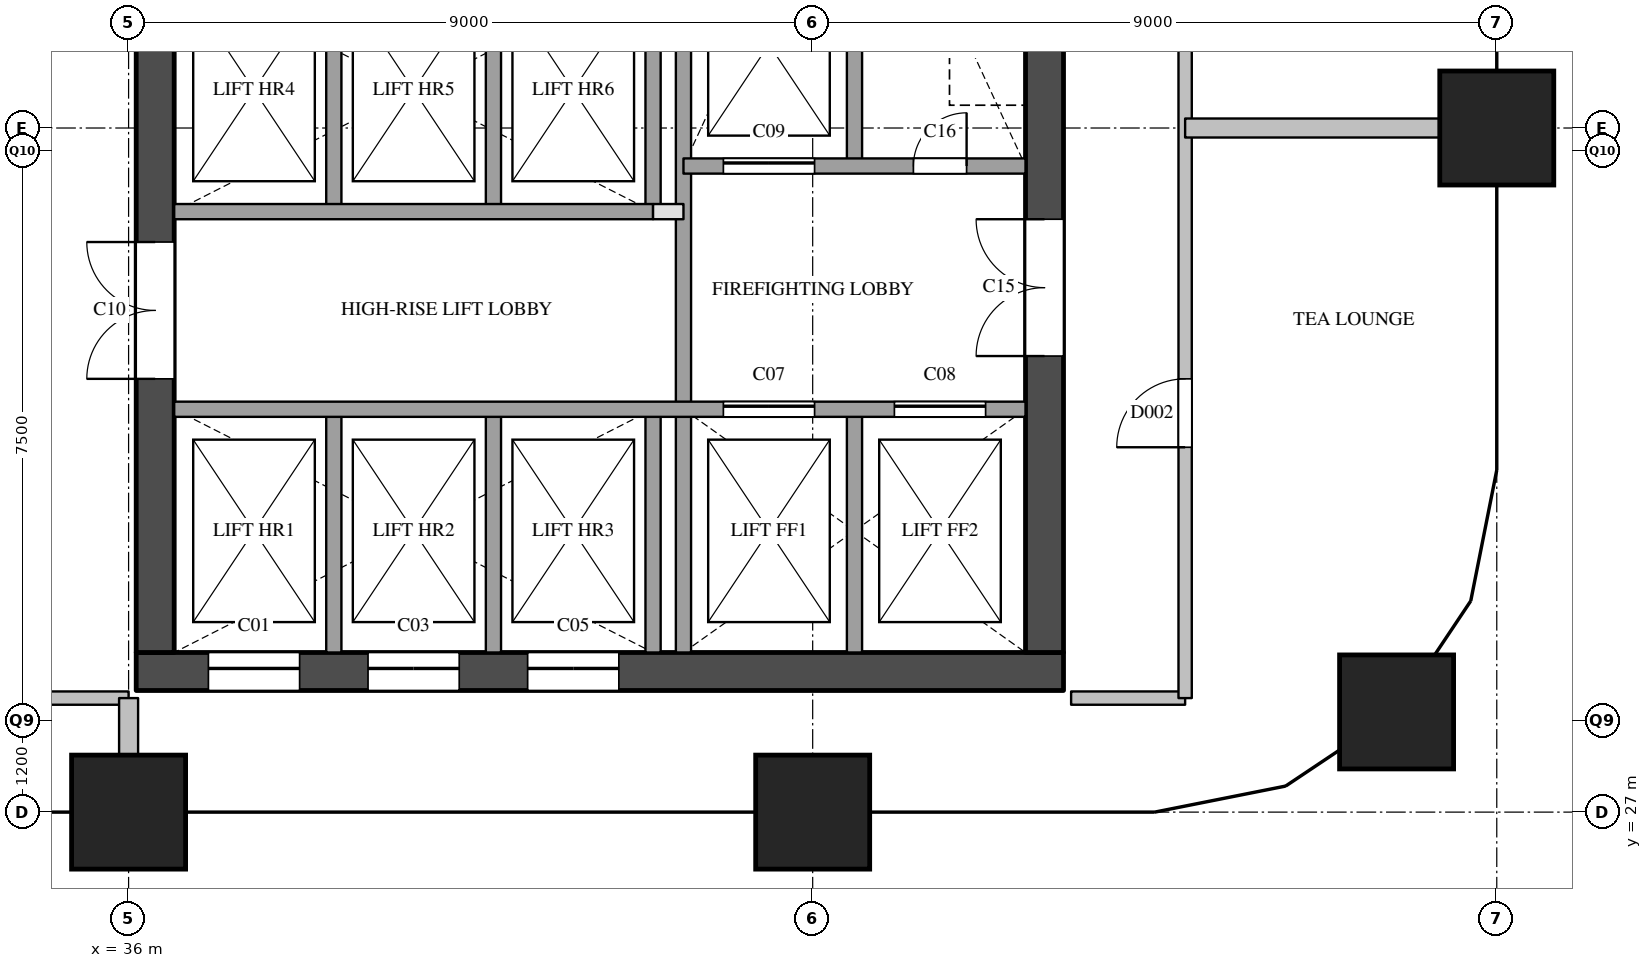
"""IFC4 building model, lengths in metres.
Left out: names, types, materials, properties, quantities, classifications, styles, units other than length and angle.
Written with IfcOpenShell. Run it as: python <this file> out.ifc"""

import sys

from ifc_helpers import new_model, si_unit, direction, frame, frame_2d, origin, origin_2d, place, context, subcontext, project, spatial, rectangle, extrude, element, fill, save


model = new_model("IFC4")
c1 = context("Model", 3, precision=1e-05, world=origin(), true_north=direction((0.0, 1.0)))
c2 = subcontext(c1, "Body", "Model", "MODEL_VIEW")
j1 = project(units=[si_unit("LENGTHUNIT", "METRE"), si_unit("PLANEANGLEUNIT", "RADIAN")], contexts=[c1])
p1 = place(None, origin())
s1 = spatial("IfcSite", under=j1, at=p1, CompositionType="ELEMENT")
p2 = place(p1, origin())
s2 = spatial("IfcBuilding", under=s1, at=p2, CompositionType="ELEMENT")
p3 = place(p2, frame((0.0, 0.0, 146.6)))
s3 = spatial("IfcBuildingStorey", under=s2, at=p3, CompositionType="ELEMENT", Elevation=146.6)
for number, where, z_axis, x_axis in (
    (1, (36.0, 27.0, 0.0), (0.0, 0.0, 1.0), (1.0, 0.0, 0.0)),
    (2, (45.0, 27.0, 0.0), (0.0, 0.0, 1.0), (1.0, 0.0, 0.0)),
    (3, (52.682, 28.318, 0.0), (0.0, 0.0, 1.0), (1.0, 0.0, 0.0)),
    (4, (54.0, 36.0, 0.0), (0.0, 0.0, 1.0), (1.0, 0.0, 0.0)),
):
    element("IfcColumn", number, at=place(p3, frame(where, z_axis=z_axis, x_axis=x_axis)), inside=s3, PredefinedType="COLUMN", context=c2, shape_type="SweptSolid", body=[
        extrude(rectangle(XDim=1.5, YDim=1.5, at=origin_2d()), origin(), (0.0, 0.0, 1.0), 3.9),
    ])
p4 = place(p3, frame((36.1, 28.85, 0.0), z_axis=(0.0, 0.0, 1.0), x_axis=(1.0, 0.0, 0.0)))
e5 = element("IfcWall", 5, at=p4, inside=s3, PredefinedType="SHEAR", context=c2, shape_type="SweptSolid", body=[
    extrude(rectangle(XDim=12.2, YDim=0.5, at=frame_2d((6.1, 0.0))), origin(), (0.0, 0.0, 1.0), 3.6),
])
p5 = place(p4, frame((0.95, 0.0, 0.0)))
e6 = element("IfcOpeningElement", 6, at=p5, cuts=e5, PredefinedType="OPENING", context=c2, shape_type="SweptSolid", body=[
    extrude(rectangle(XDim=1.2, YDim=2.1, at=frame_2d((0.6, 1.05))), frame((0.0, 0.26, 0.0), z_axis=(0.0, -1.0, 0.0), x_axis=(1.0, 0.0, 0.0)), (0.0, 0.0, 1.0), 0.52),
])
p6 = place(p4, frame((3.05, 0.0, 0.0)))
e7 = element("IfcOpeningElement", 7, at=p6, cuts=e5, PredefinedType="OPENING", context=c2, shape_type="SweptSolid", body=[
    extrude(rectangle(XDim=1.2, YDim=2.1, at=frame_2d((0.6, 1.05))), frame((0.0, 0.26, 0.0), z_axis=(0.0, -1.0, 0.0), x_axis=(1.0, 0.0, 0.0)), (0.0, 0.0, 1.0), 0.52),
])
p7 = place(p4, frame((5.15, 0.0, 0.0)))
e8 = element("IfcOpeningElement", 8, at=p7, cuts=e5, PredefinedType="OPENING", context=c2, shape_type="SweptSolid", body=[
    extrude(rectangle(XDim=1.2, YDim=2.1, at=frame_2d((0.6, 1.05))), frame((0.0, 0.26, 0.0), z_axis=(0.0, -1.0, 0.0), x_axis=(1.0, 0.0, 0.0)), (0.0, 0.0, 1.0), 0.52),
])
p8 = place(p3, frame((36.35, 29.1, 0.0), z_axis=(0.0, 0.0, 1.0), x_axis=(0.0, 1.0, 0.0)))
e9 = element("IfcWall", 9, at=p8, inside=s3, PredefinedType="SHEAR", context=c2, shape_type="SweptSolid", body=[
    extrude(rectangle(XDim=20.3, YDim=0.5, at=frame_2d((10.15, 0.0))), origin(), (0.0, 0.0, 1.0), 3.6),
])
p9 = place(p8, frame((3.6, 0.0, 0.0)))
e10 = element("IfcOpeningElement", 10, at=p9, cuts=e9, PredefinedType="OPENING", context=c2, shape_type="SweptSolid", body=[
    extrude(rectangle(XDim=1.8, YDim=2.1, at=frame_2d((0.9, 1.05))), frame((0.0, 0.26, 0.0), z_axis=(0.0, -1.0, 0.0), x_axis=(1.0, 0.0, 0.0)), (0.0, 0.0, 1.0), 0.52),
])
p10 = place(p8, frame((16.4, 0.0, 0.0)))
e11 = element("IfcOpeningElement", 11, at=p10, cuts=e9, PredefinedType="OPENING", context=c2, shape_type="SweptSolid", body=[
    extrude(rectangle(XDim=1.0, YDim=2.1, at=frame_2d((0.5, 1.05))), frame((0.0, 0.26, 0.0), z_axis=(0.0, -1.0, 0.0), x_axis=(1.0, 0.0, 0.0)), (0.0, 0.0, 1.0), 0.52),
])
p11 = place(p3, frame((48.05, 29.1, 0.0), z_axis=(0.0, 0.0, 1.0), x_axis=(0.0, 1.0, 0.0)))
e12 = element("IfcWall", 12, at=p11, inside=s3, PredefinedType="SHEAR", context=c2, shape_type="SweptSolid", body=[
    extrude(rectangle(XDim=20.3, YDim=0.5, at=frame_2d((10.15, 0.0))), origin(), (0.0, 0.0, 1.0), 3.6),
])
p12 = place(p11, frame((12.5, 0.0, 0.0)))
e13 = element("IfcOpeningElement", 13, at=p12, cuts=e12, PredefinedType="OPENING", context=c2, shape_type="SweptSolid", body=[
    extrude(rectangle(XDim=0.7, YDim=2.1, at=frame_2d((0.35, 1.05))), frame((0.0, 0.26, 0.0), z_axis=(0.0, -1.0, 0.0), x_axis=(1.0, 0.0, 0.0)), (0.0, 0.0, 1.0), 0.52),
])
p13 = place(p11, frame((3.9, 0.0, 0.0)))
e14 = element("IfcOpeningElement", 14, at=p13, cuts=e12, PredefinedType="OPENING", context=c2, shape_type="SweptSolid", body=[
    extrude(rectangle(XDim=1.8, YDim=2.1, at=frame_2d((0.9, 1.05))), frame((0.0, 0.26, 0.0), z_axis=(0.0, -1.0, 0.0), x_axis=(1.0, 0.0, 0.0)), (0.0, 0.0, 1.0), 0.52),
])
p14 = place(p3, frame((38.7, 29.1, 0.0), z_axis=(0.0, 0.0, 1.0), x_axis=(0.0, 1.0, 0.0)))
e15 = element("IfcWall", 15, at=p14, inside=s3, PredefinedType="SOLIDWALL", context=c2, shape_type="SweptSolid", body=[
    extrude(rectangle(XDim=3.2, YDim=0.2, at=frame_2d((1.6, 0.0))), origin(), (0.0, 0.0, 1.0), 3.6),
])
p15 = place(p3, frame((38.7, 34.9, 0.0), z_axis=(0.0, 0.0, 1.0), x_axis=(0.0, 1.0, 0.0)))
e16 = element("IfcWall", 16, at=p15, inside=s3, PredefinedType="SOLIDWALL", context=c2, shape_type="SweptSolid", body=[
    extrude(rectangle(XDim=3.2, YDim=0.2, at=frame_2d((1.6, 0.0))), origin(), (0.0, 0.0, 1.0), 3.6),
])
p16 = place(p3, frame((40.8, 29.1, 0.0), z_axis=(0.0, 0.0, 1.0), x_axis=(0.0, 1.0, 0.0)))
e17 = element("IfcWall", 17, at=p16, inside=s3, PredefinedType="SOLIDWALL", context=c2, shape_type="SweptSolid", body=[
    extrude(rectangle(XDim=3.2, YDim=0.2, at=frame_2d((1.6, 0.0))), origin(), (0.0, 0.0, 1.0), 3.6),
])
p17 = place(p3, frame((40.8, 34.9, 0.0), z_axis=(0.0, 0.0, 1.0), x_axis=(0.0, 1.0, 0.0)))
e18 = element("IfcWall", 18, at=p17, inside=s3, PredefinedType="SOLIDWALL", context=c2, shape_type="SweptSolid", body=[
    extrude(rectangle(XDim=3.2, YDim=0.2, at=frame_2d((1.6, 0.0))), origin(), (0.0, 0.0, 1.0), 3.6),
])
p18 = place(p3, frame((42.9, 29.1, 0.0), z_axis=(0.0, 0.0, 1.0), x_axis=(0.0, 1.0, 0.0)))
e19 = element("IfcWall", 19, at=p18, inside=s3, PredefinedType="SOLIDWALL", context=c2, shape_type="SweptSolid", body=[
    extrude(rectangle(XDim=3.2, YDim=0.2, at=frame_2d((1.6, 0.0))), origin(), (0.0, 0.0, 1.0), 3.6),
])
p19 = place(p3, frame((42.9, 34.9, 0.0), z_axis=(0.0, 0.0, 1.0), x_axis=(0.0, 1.0, 0.0)))
e20 = element("IfcWall", 20, at=p19, inside=s3, PredefinedType="SOLIDWALL", context=c2, shape_type="SweptSolid", body=[
    extrude(rectangle(XDim=3.2, YDim=0.2, at=frame_2d((1.6, 0.0))), origin(), (0.0, 0.0, 1.0), 3.6),
])
p20 = place(p3, frame((43.3, 29.1, 0.0), z_axis=(0.0, 0.0, 1.0), x_axis=(0.0, 1.0, 0.0)))
e21 = element("IfcWall", 21, at=p20, inside=s3, PredefinedType="SOLIDWALL", context=c2, shape_type="SweptSolid", body=[
    extrude(rectangle(XDim=9.9, YDim=0.2, at=frame_2d((4.95, 0.0))), origin(), (0.0, 0.0, 1.0), 3.6),
])
for number, where, z_axis, x_axis in (
    (22, (45.55, 29.1, 0.0), (0.0, 0.0, 1.0), (0.0, 1.0, 0.0)),
    (23, (45.55, 35.5, 0.0), (0.0, 0.0, 1.0), (0.0, 1.0, 0.0)),
):
    element("IfcWall", number, at=place(p3, frame(where, z_axis=z_axis, x_axis=x_axis)), inside=s3, PredefinedType="SOLIDWALL", context=c2, shape_type="SweptSolid", body=[
        extrude(rectangle(XDim=3.2, YDim=0.2, at=frame_2d((1.6, 0.0))), origin(), (0.0, 0.0, 1.0), 3.6),
    ])
p21 = place(p3, frame((36.6, 32.3, 0.0), z_axis=(0.0, 0.0, 1.0), x_axis=(1.0, 0.0, 0.0)))
e24 = element("IfcWall", 24, at=p21, inside=s3, PredefinedType="SOLIDWALL", context=c2, shape_type="SweptSolid", body=[
    extrude(rectangle(XDim=11.2, YDim=0.2, at=frame_2d((5.6, 0.0))), origin(), (0.0, 0.0, 1.0), 3.6),
])
p22 = place(p21, frame((7.225, 0.0, 0.0)))
e25 = element("IfcOpeningElement", 25, at=p22, cuts=e24, PredefinedType="OPENING", context=c2, shape_type="SweptSolid", body=[
    extrude(rectangle(XDim=1.2, YDim=2.1, at=frame_2d((0.6, 1.05))), frame((0.0, 0.11, 0.0), z_axis=(0.0, -1.0, 0.0), x_axis=(1.0, 0.0, 0.0)), (0.0, 0.0, 1.0), 0.22),
])
p23 = place(p21, frame((9.475, 0.0, 0.0)))
e26 = element("IfcOpeningElement", 26, at=p23, cuts=e24, PredefinedType="OPENING", context=c2, shape_type="SweptSolid", body=[
    extrude(rectangle(XDim=1.2, YDim=2.1, at=frame_2d((0.6, 1.05))), frame((0.0, 0.11, 0.0), z_axis=(0.0, -1.0, 0.0), x_axis=(1.0, 0.0, 0.0)), (0.0, 0.0, 1.0), 0.22),
])
p24 = place(p3, frame((42.9, 34.9, 0.0), z_axis=(0.0, 0.0, 1.0), x_axis=(1.0, 0.0, 0.0)))
e27 = element("IfcWall", 27, at=p24, inside=s3, PredefinedType="PARTITIONING", context=c2, shape_type="SweptSolid", body=[
    extrude(rectangle(XDim=0.4, YDim=0.2, at=frame_2d((0.2, 0.0))), origin(), (0.0, 0.0, 1.0), 3.6),
])
p25 = place(p3, frame((36.6, 34.9, 0.0), z_axis=(0.0, 0.0, 1.0), x_axis=(1.0, 0.0, 0.0)))
e28 = element("IfcWall", 28, at=p25, inside=s3, PredefinedType="SOLIDWALL", context=c2, shape_type="SweptSolid", body=[
    extrude(rectangle(XDim=6.3, YDim=0.2, at=frame_2d((3.15, 0.0))), origin(), (0.0, 0.0, 1.0), 3.6),
])
p26 = place(p3, frame((43.3, 35.5, 0.0), z_axis=(0.0, 0.0, 1.0), x_axis=(1.0, 0.0, 0.0)))
e29 = element("IfcWall", 29, at=p26, inside=s3, PredefinedType="SOLIDWALL", context=c2, shape_type="SweptSolid", body=[
    extrude(rectangle(XDim=4.5, YDim=0.2, at=frame_2d((2.25, 0.0))), origin(), (0.0, 0.0, 1.0), 3.6),
])
p27 = place(p26, frame((0.525, 0.0, 0.0)))
e30 = element("IfcOpeningElement", 30, at=p27, cuts=e29, PredefinedType="OPENING", context=c2, shape_type="SweptSolid", body=[
    extrude(rectangle(XDim=1.2, YDim=2.1, at=frame_2d((0.6, 1.05))), frame((0.0, 0.11, 0.0), z_axis=(0.0, -1.0, 0.0), x_axis=(1.0, 0.0, 0.0)), (0.0, 0.0, 1.0), 0.22),
])
p28 = place(p26, frame((3.025, 0.0, 0.0)))
e31 = element("IfcOpeningElement", 31, at=p28, cuts=e29, PredefinedType="OPENING", context=c2, shape_type="SweptSolid", body=[
    extrude(rectangle(XDim=0.7, YDim=2.1, at=frame_2d((0.35, 1.05))), frame((0.0, 0.11, 0.0), z_axis=(0.0, -1.0, 0.0), x_axis=(1.0, 0.0, 0.0)), (0.0, 0.0, 1.0), 0.22),
])
for number, where, z_axis, x_axis in (
    (32, (34.5, 28.5, 0.0), (0.0, 0.0, 1.0), (1.0, 0.0, 0.0)),
    (33, (48.4, 28.5, 0.0), (0.0, 0.0, 1.0), (1.0, 0.0, 0.0)),
):
    element("IfcWall", number, at=place(p3, frame(where, z_axis=z_axis, x_axis=x_axis)), inside=s3, PredefinedType="PARTITIONING", context=c2, shape_type="SweptSolid", body=[
        extrude(rectangle(XDim=1.5, YDim=0.175, at=frame_2d((0.75, 0.0))), origin(), (0.0, 0.0, 1.0), 3.6),
    ])
p29 = place(p3, frame((49.9, 28.5, 0.0), z_axis=(0.0, 0.0, 1.0), x_axis=(0.0, 1.0, 0.0)))
e34 = element("IfcWall", 34, at=p29, inside=s3, PredefinedType="PARTITIONING", context=c2, shape_type="SweptSolid", body=[
    extrude(rectangle(XDim=23.0, YDim=0.175, at=frame_2d((11.5, 0.0))), origin(), (0.0, 0.0, 1.0), 3.6),
])
p30 = place(p29, frame((3.3, 0.0, 0.0)))
e35 = element("IfcOpeningElement", 35, at=p30, cuts=e34, PredefinedType="OPENING", context=c2, shape_type="SweptSolid", body=[
    extrude(rectangle(XDim=0.9, YDim=2.1, at=frame_2d((0.45, 1.05))), frame((0.0, 0.097, 0.0), z_axis=(0.0, -1.0, 0.0), x_axis=(1.0, 0.0, 0.0)), (0.0, 0.0, 1.0), 0.195),
])
p31 = place(p29, frame((12.45, 0.0, 0.0)))
e36 = element("IfcOpeningElement", 36, at=p31, cuts=e34, PredefinedType="OPENING", context=c2, shape_type="SweptSolid", body=[
    extrude(rectangle(XDim=0.9, YDim=2.1, at=frame_2d((0.45, 1.05))), frame((0.0, 0.097, 0.0), z_axis=(0.0, -1.0, 0.0), x_axis=(1.0, 0.0, 0.0)), (0.0, 0.0, 1.0), 0.195),
])
p32 = place(p29, frame((20.2, 0.0, 0.0)))
e37 = element("IfcOpeningElement", 37, at=p32, cuts=e34, PredefinedType="OPENING", context=c2, shape_type="SweptSolid", body=[
    extrude(rectangle(XDim=0.9, YDim=2.1, at=frame_2d((0.45, 1.05))), frame((0.0, 0.097, 0.0), z_axis=(0.0, -1.0, 0.0), x_axis=(1.0, 0.0, 0.0)), (0.0, 0.0, 1.0), 0.195),
])
p33 = place(p3, frame((49.9, 36.0, 0.0), z_axis=(0.0, 0.0, 1.0), x_axis=(1.0, 0.0, 0.0)))
e38 = element("IfcWall", 38, at=p33, inside=s3, PredefinedType="PARTITIONING", context=c2, shape_type="SweptSolid", body=[
    extrude(rectangle(XDim=4.1, YDim=0.25, at=frame_2d((2.05, 0.0))), origin(), (0.0, 0.0, 1.0), 3.6),
])
p34 = place(p3, frame((36.0, 27.0, 0.0), z_axis=(0.0, 0.0, 1.0), x_axis=(0.0, 1.0, 0.0)))
e39 = element("IfcWall", 39, at=p34, inside=s3, PredefinedType="PARTITIONING", context=c2, shape_type="SweptSolid", body=[
    extrude(rectangle(XDim=1.5, YDim=0.25, at=frame_2d((0.75, 0.0))), origin(), (0.0, 0.0, 1.0), 3.6),
])
p35 = place(p5, origin())
e40 = element("IfcDoor", 40, at=p35, inside=s3, OperationType="SLIDING_TO_LEFT", PredefinedType="DOOR", context=c2, shape_type="SweptSolid", body=[
    extrude(rectangle(XDim=1.2, YDim=2.1, at=frame_2d((0.6, 1.05))), frame((0.0, 0.025, 0.0), z_axis=(0.0, -1.0, 0.0), x_axis=(1.0, 0.0, 0.0)), (0.0, 0.0, 1.0), 0.05),
])
fill(e6, e40)
p36 = place(p6, origin())
e41 = element("IfcDoor", 41, at=p36, inside=s3, OperationType="SLIDING_TO_LEFT", PredefinedType="DOOR", context=c2, shape_type="SweptSolid", body=[
    extrude(rectangle(XDim=1.2, YDim=2.1, at=frame_2d((0.6, 1.05))), frame((0.0, 0.025, 0.0), z_axis=(0.0, -1.0, 0.0), x_axis=(1.0, 0.0, 0.0)), (0.0, 0.0, 1.0), 0.05),
])
fill(e7, e41)
p37 = place(p7, origin())
e42 = element("IfcDoor", 42, at=p37, inside=s3, OperationType="SLIDING_TO_LEFT", PredefinedType="DOOR", context=c2, shape_type="SweptSolid", body=[
    extrude(rectangle(XDim=1.2, YDim=2.1, at=frame_2d((0.6, 1.05))), frame((0.0, 0.025, 0.0), z_axis=(0.0, -1.0, 0.0), x_axis=(1.0, 0.0, 0.0)), (0.0, 0.0, 1.0), 0.05),
])
fill(e8, e42)
p38 = place(p22, origin())
e43 = element("IfcDoor", 43, at=p38, inside=s3, OperationType="SLIDING_TO_LEFT", PredefinedType="DOOR", context=c2, shape_type="SweptSolid", body=[
    extrude(rectangle(XDim=1.2, YDim=2.1, at=frame_2d((0.6, 1.05))), frame((0.0, 0.025, 0.0), z_axis=(0.0, -1.0, 0.0), x_axis=(1.0, 0.0, 0.0)), (0.0, 0.0, 1.0), 0.05),
])
fill(e25, e43)
p39 = place(p23, origin())
e44 = element("IfcDoor", 44, at=p39, inside=s3, OperationType="SLIDING_TO_LEFT", PredefinedType="DOOR", context=c2, shape_type="SweptSolid", body=[
    extrude(rectangle(XDim=1.2, YDim=2.1, at=frame_2d((0.6, 1.05))), frame((0.0, 0.025, 0.0), z_axis=(0.0, -1.0, 0.0), x_axis=(1.0, 0.0, 0.0)), (0.0, 0.0, 1.0), 0.05),
])
fill(e26, e44)
p40 = place(p27, origin())
e45 = element("IfcDoor", 45, at=p40, inside=s3, OperationType="SLIDING_TO_LEFT", PredefinedType="DOOR", context=c2, shape_type="SweptSolid", body=[
    extrude(rectangle(XDim=1.2, YDim=2.1, at=frame_2d((0.6, 1.05))), frame((0.0, 0.025, 0.0), z_axis=(0.0, -1.0, 0.0), x_axis=(1.0, 0.0, 0.0)), (0.0, 0.0, 1.0), 0.05),
])
fill(e30, e45)
p41 = place(p9, origin())
e46 = element("IfcDoor", 46, at=p41, inside=s3, OperationType="DOUBLE_DOOR_SINGLE_SWING", PredefinedType="DOOR", context=c2, shape_type="SweptSolid", body=[
    extrude(rectangle(XDim=1.8, YDim=2.1, at=frame_2d((0.9, 1.05))), frame((0.0, 0.025, 0.0), z_axis=(0.0, -1.0, 0.0), x_axis=(1.0, 0.0, 0.0)), (0.0, 0.0, 1.0), 0.05),
])
fill(e10, e46)
p42 = place(p13, origin())
e47 = element("IfcDoor", 47, at=p42, inside=s3, OperationType="DOUBLE_DOOR_SINGLE_SWING", PredefinedType="DOOR", context=c2, shape_type="SweptSolid", body=[
    extrude(rectangle(XDim=1.8, YDim=2.1, at=frame_2d((0.9, 1.05))), frame((0.0, 0.025, 0.0), z_axis=(0.0, -1.0, 0.0), x_axis=(1.0, 0.0, 0.0)), (0.0, 0.0, 1.0), 0.05),
])
fill(e14, e47)
p43 = place(p28, origin())
e48 = element("IfcDoor", 48, at=p43, inside=s3, OperationType="SINGLE_SWING_RIGHT", PredefinedType="DOOR", context=c2, shape_type="SweptSolid", body=[
    extrude(rectangle(XDim=0.7, YDim=2.1, at=frame_2d((0.35, 1.05))), frame((0.0, 0.025, 0.0), z_axis=(0.0, -1.0, 0.0), x_axis=(1.0, 0.0, 0.0)), (0.0, 0.0, 1.0), 0.05),
])
fill(e31, e48)
p44 = place(p30, origin())
e49 = element("IfcDoor", 49, at=p44, inside=s3, OperationType="SINGLE_SWING_LEFT", PredefinedType="DOOR", context=c2, shape_type="SweptSolid", body=[
    extrude(rectangle(XDim=0.9, YDim=2.1, at=frame_2d((0.45, 1.05))), frame((0.0, 0.025, 0.0), z_axis=(0.0, -1.0, 0.0), x_axis=(1.0, 0.0, 0.0)), (0.0, 0.0, 1.0), 0.05),
])
fill(e35, e49)
save(model, sys.argv[1])
